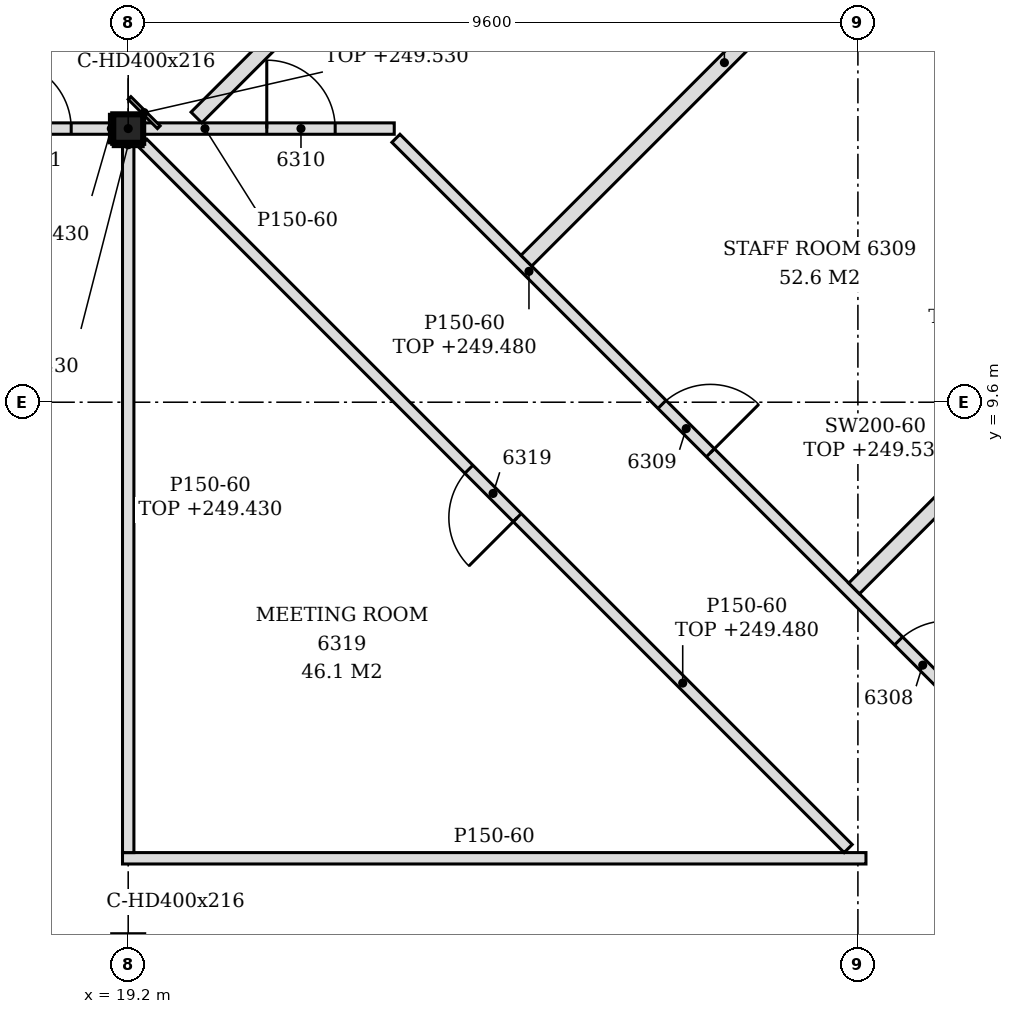
"""IFC4 building model, lengths in metres.
Left out: names, types, materials, properties, quantities, classifications, styles, units other than length and angle.
Written with IfcOpenShell. Run it as: python <this file> out.ifc"""

import sys

from ifc_helpers import new_model, si_unit, direction, frame, frame_2d, origin, origin_2d, place, context, subcontext, project, spatial, polyline, rectangle, i_section, outline, extrude, element, fill, save


model = new_model("IFC4")
c1 = context("Model", 3, precision=1e-05, world=origin(), true_north=direction((0.0, 1.0)))
c2 = subcontext(c1, "Body", "Model", "MODEL_VIEW")
j1 = project(units=[si_unit("LENGTHUNIT", "METRE"), si_unit("PLANEANGLEUNIT", "RADIAN")], contexts=[c1])
p1 = place(None, origin())
s1 = spatial("IfcSite", under=j1, at=p1, CompositionType="ELEMENT")
p2 = place(p1, origin())
s2 = spatial("IfcBuilding", under=s1, at=p2, CompositionType="ELEMENT")
p3 = place(p2, frame((0.0, 0.0, 246.6)))
s3 = spatial("IfcBuildingStorey", under=s2, at=p3, CompositionType="ELEMENT", Elevation=246.6)
p4 = place(p3, frame((19.2, 13.2, -0.15), z_axis=(0.0, 0.0, 1.0), x_axis=(1.0, 0.0, 0.0)))
e1 = element("IfcColumn", 1, at=p4, inside=s3, PredefinedType="COLUMN", context=c2, shape_type="SweptSolid", body=[
    extrude(i_section(OverallWidth=0.394, OverallDepth=0.375, WebThickness=0.017, FlangeThickness=0.028, FilletRadius=0.015, at=origin_2d()), origin(), (0.0, 0.0, 1.0), 3.6),
])
p5 = place(p3, frame((34.8, 0.994, 0.0), z_axis=(0.0, 0.0, 1.0), x_axis=(-0.707099634543, 0.707113927758, 0.0)))
e2 = element("IfcWall", 2, at=p5, inside=s3, PredefinedType="PARTITIONING", context=c2, shape_type="SweptSolid", body=[
    extrude(rectangle(XDim=17.081, YDim=0.15, at=frame_2d((8.541, 0.0))), origin(), (0.0, 0.0, 1.0), 2.88),
])
p6 = place(p5, frame((3.276, 0.0, 0.0)))
e3 = element("IfcOpeningElement", 3, at=p6, cuts=e2, PredefinedType="OPENING", context=c2, shape_type="SweptSolid", body=[
    extrude(rectangle(XDim=0.9, YDim=2.1, at=frame_2d((0.45, 1.05))), frame((0.0, 0.085, 0.0), z_axis=(0.0, -1.0, 0.0), x_axis=(1.0, 0.0, 0.0)), (0.0, 0.0, 1.0), 0.17),
])
p7 = place(p5, frame((6.829, 0.0, 0.0)))
e4 = element("IfcOpeningElement", 4, at=p7, cuts=e2, PredefinedType="OPENING", context=c2, shape_type="SweptSolid", body=[
    extrude(rectangle(XDim=0.9, YDim=2.1, at=frame_2d((0.45, 1.05))), frame((0.0, 0.085, 0.0), z_axis=(0.0, -1.0, 0.0), x_axis=(1.0, 0.0, 0.0)), (0.0, 0.0, 1.0), 0.17),
])
p8 = place(p5, frame((11.23, 0.0, 0.0)))
e5 = element("IfcOpeningElement", 5, at=p8, cuts=e2, PredefinedType="OPENING", context=c2, shape_type="SweptSolid", body=[
    extrude(rectangle(XDim=0.9, YDim=2.1, at=frame_2d((0.45, 1.05))), frame((0.0, 0.085, 0.0), z_axis=(0.0, -1.0, 0.0), x_axis=(1.0, 0.0, 0.0)), (0.0, 0.0, 1.0), 0.17),
])
p9 = place(p3, frame((19.125, 3.6, 0.0), z_axis=(0.0, 0.0, 1.0), x_axis=(1.0, 0.0, 0.0)))
e6 = element("IfcWall", 6, at=p9, inside=s3, PredefinedType="PARTITIONING", context=c2, shape_type="SweptSolid", body=[
    extrude(outline(polyline([(0.0, 0.0), (9.781, 0.0), (9.781, 3.45), (0.225, 3.45), (0.223, 2.83), (0.0, 2.83), (0.0, 0.0)])), frame((0.0, 0.075, 0.0), z_axis=(0.0, -1.0, 0.0), x_axis=(1.0, 0.0, 0.0)), (0.0, 0.0, 1.0), 0.15),
])
p10 = place(p3, frame((19.2, 3.675, 0.0), z_axis=(0.0, 0.0, 1.0), x_axis=(0.0, 1.0, 0.0)))
e7 = element("IfcWall", 7, at=p10, inside=s3, PredefinedType="PARTITIONING", context=c2, shape_type="SweptSolid", body=[
    extrude(rectangle(XDim=9.337, YDim=0.15, at=frame_2d((4.669, 0.0))), origin(), (0.0, 0.0, 1.0), 2.83),
])
p11 = place(p3, frame((28.672, 3.728, 0.0), z_axis=(0.0, 0.0, 1.0), x_axis=(-0.707106781187, 0.707106781187, 0.0)))
e8 = element("IfcWall", 8, at=p11, inside=s3, PredefinedType="PARTITIONING", context=c2, shape_type="SweptSolid", body=[
    extrude(rectangle(XDim=13.124, YDim=0.15, at=frame_2d((6.562, 0.0))), origin(), (0.0, 0.0, 1.0), 2.88),
])
p12 = place(p11, frame((6.157, 0.0, 0.0)))
e9 = element("IfcOpeningElement", 9, at=p12, cuts=e8, PredefinedType="OPENING", context=c2, shape_type="SweptSolid", body=[
    extrude(rectangle(XDim=0.9, YDim=2.1, at=frame_2d((0.45, 1.05))), frame((0.0, 0.085, 0.0), z_axis=(0.0, -1.0, 0.0), x_axis=(1.0, 0.0, 0.0)), (0.0, 0.0, 1.0), 0.17),
])
p13 = place(p3, frame((28.75, 7.15, 0.0), z_axis=(0.0, 0.0, 1.0), x_axis=(0.7070684525, 0.707145107796, 0.0)))
e10 = element("IfcWall", 10, at=p13, inside=s3, PredefinedType="PARTITIONING", context=c2, shape_type="SweptSolid", body=[
    extrude(rectangle(XDim=3.185, YDim=0.2, at=frame_2d((1.592, 0.0))), origin(), (0.0, 0.0, 1.0), 2.93),
])
p14 = place(p3, frame((24.438, 11.462, 0.0), z_axis=(0.0, 0.0, 1.0), x_axis=(0.707090216072, 0.707123345913, 0.0)))
e11 = element("IfcWall", 11, at=p14, inside=s3, PredefinedType="PARTITIONING", context=c2, shape_type="SweptSolid", body=[
    extrude(rectangle(XDim=7.369, YDim=0.2, at=frame_2d((3.685, 0.0))), origin(), (0.0, 0.0, 1.0), 2.88),
])
p15 = place(p3, frame((7.397, 13.2, 0.0), z_axis=(0.0, 0.0, 1.0), x_axis=(1.0, 0.0, 0.0)))
e12 = element("IfcWall", 12, at=p15, inside=s3, PredefinedType="PARTITIONING", context=c2, shape_type="SweptSolid", body=[
    extrude(rectangle(XDim=11.606, YDim=0.15, at=frame_2d((5.803, 0.0))), origin(), (0.0, 0.0, 1.0), 2.83),
])
p16 = place(p15, frame((10.153, 0.0, 0.0)))
e13 = element("IfcOpeningElement", 13, at=p16, cuts=e12, PredefinedType="OPENING", context=c2, shape_type="SweptSolid", body=[
    extrude(rectangle(XDim=0.9, YDim=2.1, at=frame_2d((0.45, 1.05))), frame((0.0, 0.085, 0.0), z_axis=(0.0, -1.0, 0.0), x_axis=(1.0, 0.0, 0.0)), (0.0, 0.0, 1.0), 0.17),
])
p17 = place(p3, frame((19.397, 13.2, 0.0), z_axis=(0.0, 0.0, 1.0), x_axis=(1.0, 0.0, 0.0)))
e14 = element("IfcWall", 14, at=p17, inside=s3, PredefinedType="PARTITIONING", context=c2, shape_type="SweptSolid", body=[
    extrude(rectangle(XDim=3.303, YDim=0.15, at=frame_2d((1.652, 0.0))), origin(), (0.0, 0.0, 1.0), 3.45),
])
p18 = place(p17, frame((1.626, 0.0, 0.0)))
e15 = element("IfcOpeningElement", 15, at=p18, cuts=e14, PredefinedType="OPENING", context=c2, shape_type="SweptSolid", body=[
    extrude(rectangle(XDim=0.9, YDim=2.1, at=frame_2d((0.45, 1.05))), frame((0.0, 0.085, 0.0), z_axis=(0.0, -1.0, 0.0), x_axis=(1.0, 0.0, 0.0)), (0.0, 0.0, 1.0), 0.17),
])
p19 = place(p3, frame((20.098, 13.346, 0.0), z_axis=(0.0, 0.0, 1.0), x_axis=(0.707119095079, 0.70709446708, 0.0)))
e16 = element("IfcWall", 16, at=p19, inside=s3, PredefinedType="PARTITIONING", context=c2, shape_type="SweptSolid", body=[
    extrude(rectangle(XDim=9.913, YDim=0.2, at=frame_2d((4.957, 0.0))), origin(), (0.0, 0.0, 1.0), 2.88),
])
p20 = place(p3, frame((18.978, 13.012, 0.0), z_axis=(0.0, 0.0, 1.0), x_axis=(0.0, 1.0, 0.0)))
e17 = element("IfcWall", 17, at=p20, inside=s3, PredefinedType="PARTITIONING", context=c2, shape_type="SweptSolid", body=[
    extrude(rectangle(XDim=0.375, YDim=0.05, at=frame_2d((0.188, 0.0))), origin(), (0.0, 0.0, 1.0), 2.83),
])
p21 = place(p3, frame((19.602, 13.218, 0.0), z_axis=(0.0, 0.0, 1.0), x_axis=(-0.707106781187, 0.707106781187, 0.0)))
e18 = element("IfcWall", 18, at=p21, inside=s3, PredefinedType="PARTITIONING", context=c2, shape_type="SweptSolid", body=[
    extrude(rectangle(XDim=0.544, YDim=0.05, at=frame_2d((0.272, 0.0))), origin(), (0.0, 0.0, 1.0), 2.93),
])
p22 = place(p3, frame((19.003, 12.988, 0.0), z_axis=(0.0, 0.0, 1.0), x_axis=(1.0, 0.0, 0.0)))
e19 = element("IfcWall", 19, at=p22, inside=s3, PredefinedType="PARTITIONING", context=c2, shape_type="SweptSolid", body=[
    extrude(rectangle(XDim=0.394, YDim=0.05, at=frame_2d((0.197, 0.0))), origin(), (0.0, 0.0, 1.0), 2.83),
])
p23 = place(p7, frame((0.9, 0.0, 0.0), z_axis=(0.0, 0.0, 1.0), x_axis=(-1.0, 0.0, 0.0)))
e20 = element("IfcDoor", 20, at=p23, inside=s3, OperationType="SINGLE_SWING_RIGHT", PredefinedType="DOOR", context=c2, shape_type="SweptSolid", body=[
    extrude(rectangle(XDim=0.9, YDim=2.1, at=frame_2d((0.45, 1.05))), frame((0.0, 0.025, 0.0), z_axis=(0.0, -1.0, 0.0), x_axis=(1.0, 0.0, 0.0)), (0.0, 0.0, 1.0), 0.05),
])
fill(e4, e20)
p24 = place(p8, frame((0.9, 0.0, 0.0), z_axis=(0.0, 0.0, 1.0), x_axis=(-1.0, 0.0, 0.0)))
e21 = element("IfcDoor", 21, at=p24, inside=s3, OperationType="SINGLE_SWING_RIGHT", PredefinedType="DOOR", context=c2, shape_type="SweptSolid", body=[
    extrude(rectangle(XDim=0.9, YDim=2.1, at=frame_2d((0.45, 1.05))), frame((0.0, 0.025, 0.0), z_axis=(0.0, -1.0, 0.0), x_axis=(1.0, 0.0, 0.0)), (0.0, 0.0, 1.0), 0.05),
])
fill(e5, e21)
p25 = place(p18, origin())
e22 = element("IfcDoor", 22, at=p25, inside=s3, OperationType="SINGLE_SWING_LEFT", PredefinedType="DOOR", context=c2, shape_type="SweptSolid", body=[
    extrude(rectangle(XDim=0.9, YDim=2.1, at=frame_2d((0.45, 1.05))), frame((0.0, 0.025, 0.0), z_axis=(0.0, -1.0, 0.0), x_axis=(1.0, 0.0, 0.0)), (0.0, 0.0, 1.0), 0.05),
])
fill(e15, e22)
p26 = place(p16, origin())
e23 = element("IfcDoor", 23, at=p26, inside=s3, OperationType="SINGLE_SWING_LEFT", PredefinedType="DOOR", context=c2, shape_type="SweptSolid", body=[
    extrude(rectangle(XDim=0.9, YDim=2.1, at=frame_2d((0.45, 1.05))), frame((0.0, 0.025, 0.0), z_axis=(0.0, -1.0, 0.0), x_axis=(1.0, 0.0, 0.0)), (0.0, 0.0, 1.0), 0.05),
])
fill(e13, e23)
p27 = place(p12, origin())
e24 = element("IfcDoor", 24, at=p27, inside=s3, OperationType="SINGLE_SWING_LEFT", PredefinedType="DOOR", context=c2, shape_type="SweptSolid", body=[
    extrude(rectangle(XDim=0.9, YDim=2.1, at=frame_2d((0.45, 1.05))), frame((0.0, 0.025, 0.0), z_axis=(0.0, -1.0, 0.0), x_axis=(1.0, 0.0, 0.0)), (0.0, 0.0, 1.0), 0.05),
])
fill(e9, e24)
save(model, sys.argv[1])
